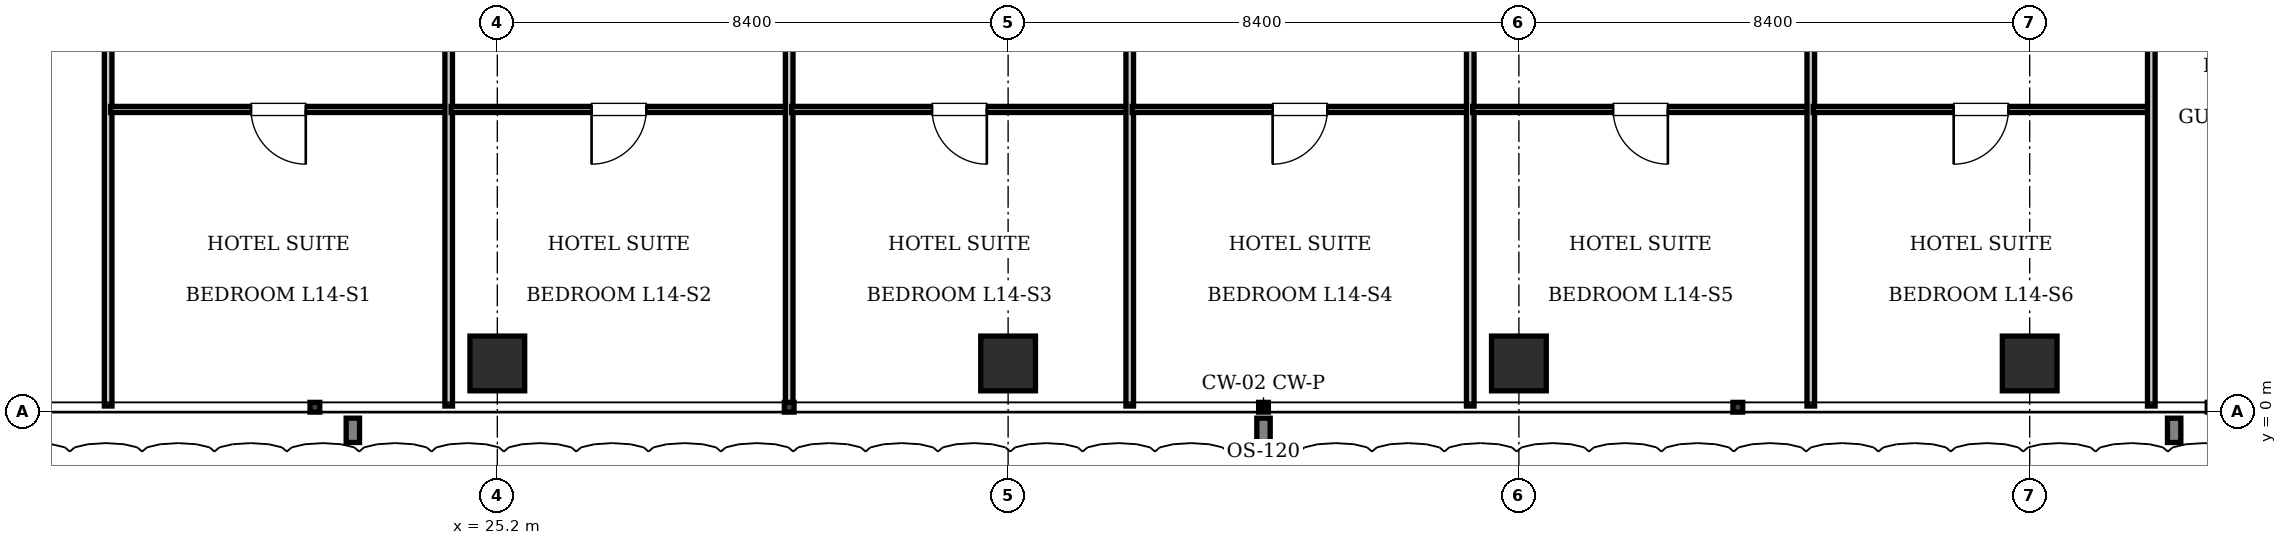
"""IFC4 building model, lengths in metres.
Left out: names, types, materials, properties, quantities, classifications, styles, units other than length and angle.
Written with IfcOpenShell. Run it as: python <this file> out.ifc"""

import sys

from ifc_helpers import new_model, si_unit, direction, frame, frame_2d, origin, origin_2d, place, context, subcontext, project, spatial, rectangle, extrude, element, fill, save


model = new_model("IFC4")
c1 = context("Model", 3, precision=1e-05, world=origin(), true_north=direction((0.0, 1.0)))
c2 = subcontext(c1, "Body", "Model", "MODEL_VIEW")
j1 = project(units=[si_unit("LENGTHUNIT", "METRE"), si_unit("PLANEANGLEUNIT", "RADIAN")], contexts=[c1])
p1 = place(None, origin())
s1 = spatial("IfcSite", under=j1, at=p1, CompositionType="ELEMENT")
p2 = place(p1, origin())
s2 = spatial("IfcBuilding", under=s1, at=p2, CompositionType="ELEMENT")
p3 = place(p2, frame((0.0, 0.0, 61.6)))
s3 = spatial("IfcBuildingStorey", under=s2, at=p3, CompositionType="ELEMENT", Elevation=61.6)
for number, where, z_axis, x_axis in (
    (1, (25.2, 0.8, 0.0), (0.0, 0.0, 1.0), (1.0, 0.0, 0.0)),
    (2, (33.6, 0.8, 0.0), (0.0, 0.0, 1.0), (1.0, 0.0, 0.0)),
    (3, (42.0, 0.8, 0.0), (0.0, 0.0, 1.0), (1.0, 0.0, 0.0)),
    (4, (50.4, 0.8, 0.0), (0.0, 0.0, 1.0), (1.0, 0.0, 0.0)),
):
    element("IfcColumn", number, at=place(p3, frame(where, z_axis=z_axis, x_axis=x_axis)), inside=s3, PredefinedType="COLUMN", context=c2, shape_type="SweptSolid", body=[
        extrude(rectangle(XDim=0.9, YDim=0.9, at=origin_2d()), origin(), (0.0, 0.0, 1.0), 3.85),
    ])
p4 = place(p3, frame((18.8, 0.1, 0.0), z_axis=(0.0, 0.0, 1.0), x_axis=(0.0, 1.0, 0.0)))
e5 = element("IfcWall", 5, at=p4, inside=s3, PredefinedType="PARTITIONING", context=c2, shape_type="SweptSolid", body=[
    extrude(rectangle(XDim=13.22, YDim=0.125, at=frame_2d((6.61, 0.0))), origin(), (0.0, 0.0, 1.0), 3.61),
])
p5 = place(p3, frame((18.84, 4.977, 0.0), z_axis=(0.0, 0.0, 1.0), x_axis=(1.0, 0.0, 0.0)))
e6 = element("IfcWall", 6, at=p5, inside=s3, PredefinedType="PARTITIONING", context=c2, shape_type="SweptSolid", body=[
    extrude(rectangle(XDim=5.52, YDim=0.1, at=frame_2d((2.76, 0.0))), origin(), (0.0, 0.0, 1.0), 3.61),
])
p6 = place(p5, frame((2.31, 0.0, 0.0)))
e7 = element("IfcOpeningElement", 7, at=p6, cuts=e6, PredefinedType="OPENING", context=c2, shape_type="SweptSolid", body=[
    extrude(rectangle(XDim=0.9, YDim=2.1, at=frame_2d((0.45, 1.05))), frame((0.0, 0.06, 0.0), z_axis=(0.0, -1.0, 0.0), x_axis=(1.0, 0.0, 0.0)), (0.0, 0.0, 1.0), 0.12),
])
p7 = place(p3, frame((24.4, 0.1, 0.0), z_axis=(0.0, 0.0, 1.0), x_axis=(0.0, 1.0, 0.0)))
e8 = element("IfcWall", 8, at=p7, inside=s3, PredefinedType="PARTITIONING", context=c2, shape_type="SweptSolid", body=[
    extrude(rectangle(XDim=13.22, YDim=0.125, at=frame_2d((6.61, 0.0))), origin(), (0.0, 0.0, 1.0), 3.61),
])
p8 = place(p3, frame((24.44, 4.977, 0.0), z_axis=(0.0, 0.0, 1.0), x_axis=(1.0, 0.0, 0.0)))
e9 = element("IfcWall", 9, at=p8, inside=s3, PredefinedType="PARTITIONING", context=c2, shape_type="SweptSolid", body=[
    extrude(rectangle(XDim=5.52, YDim=0.1, at=frame_2d((2.76, 0.0))), origin(), (0.0, 0.0, 1.0), 3.61),
])
p9 = place(p8, frame((2.31, 0.0, 0.0)))
e10 = element("IfcOpeningElement", 10, at=p9, cuts=e9, PredefinedType="OPENING", context=c2, shape_type="SweptSolid", body=[
    extrude(rectangle(XDim=0.9, YDim=2.1, at=frame_2d((0.45, 1.05))), frame((0.0, 0.06, 0.0), z_axis=(0.0, -1.0, 0.0), x_axis=(1.0, 0.0, 0.0)), (0.0, 0.0, 1.0), 0.12),
])
p10 = place(p3, frame((30.0, 0.1, 0.0), z_axis=(0.0, 0.0, 1.0), x_axis=(0.0, 1.0, 0.0)))
e11 = element("IfcWall", 11, at=p10, inside=s3, PredefinedType="PARTITIONING", context=c2, shape_type="SweptSolid", body=[
    extrude(rectangle(XDim=13.22, YDim=0.125, at=frame_2d((6.61, 0.0))), origin(), (0.0, 0.0, 1.0), 3.61),
])
p11 = place(p3, frame((30.04, 4.977, 0.0), z_axis=(0.0, 0.0, 1.0), x_axis=(1.0, 0.0, 0.0)))
e12 = element("IfcWall", 12, at=p11, inside=s3, PredefinedType="PARTITIONING", context=c2, shape_type="SweptSolid", body=[
    extrude(rectangle(XDim=5.52, YDim=0.1, at=frame_2d((2.76, 0.0))), origin(), (0.0, 0.0, 1.0), 3.61),
])
p12 = place(p11, frame((2.31, 0.0, 0.0)))
e13 = element("IfcOpeningElement", 13, at=p12, cuts=e12, PredefinedType="OPENING", context=c2, shape_type="SweptSolid", body=[
    extrude(rectangle(XDim=0.9, YDim=2.1, at=frame_2d((0.45, 1.05))), frame((0.0, 0.06, 0.0), z_axis=(0.0, -1.0, 0.0), x_axis=(1.0, 0.0, 0.0)), (0.0, 0.0, 1.0), 0.12),
])
p13 = place(p3, frame((35.6, 0.1, 0.0), z_axis=(0.0, 0.0, 1.0), x_axis=(0.0, 1.0, 0.0)))
e14 = element("IfcWall", 14, at=p13, inside=s3, PredefinedType="PARTITIONING", context=c2, shape_type="SweptSolid", body=[
    extrude(rectangle(XDim=13.22, YDim=0.125, at=frame_2d((6.61, 0.0))), origin(), (0.0, 0.0, 1.0), 3.61),
])
p14 = place(p3, frame((35.64, 4.977, 0.0), z_axis=(0.0, 0.0, 1.0), x_axis=(1.0, 0.0, 0.0)))
e15 = element("IfcWall", 15, at=p14, inside=s3, PredefinedType="PARTITIONING", context=c2, shape_type="SweptSolid", body=[
    extrude(rectangle(XDim=5.52, YDim=0.1, at=frame_2d((2.76, 0.0))), origin(), (0.0, 0.0, 1.0), 3.61),
])
p15 = place(p14, frame((2.31, 0.0, 0.0)))
e16 = element("IfcOpeningElement", 16, at=p15, cuts=e15, PredefinedType="OPENING", context=c2, shape_type="SweptSolid", body=[
    extrude(rectangle(XDim=0.9, YDim=2.1, at=frame_2d((0.45, 1.05))), frame((0.0, 0.06, 0.0), z_axis=(0.0, -1.0, 0.0), x_axis=(1.0, 0.0, 0.0)), (0.0, 0.0, 1.0), 0.12),
])
p16 = place(p3, frame((41.2, 0.1, 0.0), z_axis=(0.0, 0.0, 1.0), x_axis=(0.0, 1.0, 0.0)))
e17 = element("IfcWall", 17, at=p16, inside=s3, PredefinedType="PARTITIONING", context=c2, shape_type="SweptSolid", body=[
    extrude(rectangle(XDim=13.22, YDim=0.125, at=frame_2d((6.61, 0.0))), origin(), (0.0, 0.0, 1.0), 3.61),
])
p17 = place(p3, frame((41.24, 4.977, 0.0), z_axis=(0.0, 0.0, 1.0), x_axis=(1.0, 0.0, 0.0)))
e18 = element("IfcWall", 18, at=p17, inside=s3, PredefinedType="PARTITIONING", context=c2, shape_type="SweptSolid", body=[
    extrude(rectangle(XDim=5.52, YDim=0.1, at=frame_2d((2.76, 0.0))), origin(), (0.0, 0.0, 1.0), 3.61),
])
p18 = place(p17, frame((2.31, 0.0, 0.0)))
e19 = element("IfcOpeningElement", 19, at=p18, cuts=e18, PredefinedType="OPENING", context=c2, shape_type="SweptSolid", body=[
    extrude(rectangle(XDim=0.9, YDim=2.1, at=frame_2d((0.45, 1.05))), frame((0.0, 0.06, 0.0), z_axis=(0.0, -1.0, 0.0), x_axis=(1.0, 0.0, 0.0)), (0.0, 0.0, 1.0), 0.12),
])
p19 = place(p3, frame((46.8, 0.1, 0.0), z_axis=(0.0, 0.0, 1.0), x_axis=(0.0, 1.0, 0.0)))
e20 = element("IfcWall", 20, at=p19, inside=s3, PredefinedType="PARTITIONING", context=c2, shape_type="SweptSolid", body=[
    extrude(rectangle(XDim=13.22, YDim=0.125, at=frame_2d((6.61, 0.0))), origin(), (0.0, 0.0, 1.0), 3.61),
])
p20 = place(p3, frame((46.84, 4.977, 0.0), z_axis=(0.0, 0.0, 1.0), x_axis=(1.0, 0.0, 0.0)))
e21 = element("IfcWall", 21, at=p20, inside=s3, PredefinedType="PARTITIONING", context=c2, shape_type="SweptSolid", body=[
    extrude(rectangle(XDim=5.52, YDim=0.1, at=frame_2d((2.76, 0.0))), origin(), (0.0, 0.0, 1.0), 3.61),
])
p21 = place(p20, frame((2.31, 0.0, 0.0)))
e22 = element("IfcOpeningElement", 22, at=p21, cuts=e21, PredefinedType="OPENING", context=c2, shape_type="SweptSolid", body=[
    extrude(rectangle(XDim=0.9, YDim=2.1, at=frame_2d((0.45, 1.05))), frame((0.0, 0.06, 0.0), z_axis=(0.0, -1.0, 0.0), x_axis=(1.0, 0.0, 0.0)), (0.0, 0.0, 1.0), 0.12),
])
p22 = place(p3, frame((52.4, 0.1, 0.0), z_axis=(0.0, 0.0, 1.0), x_axis=(0.0, 1.0, 0.0)))
e23 = element("IfcWall", 23, at=p22, inside=s3, PredefinedType="PARTITIONING", context=c2, shape_type="SweptSolid", body=[
    extrude(rectangle(XDim=13.22, YDim=0.125, at=frame_2d((6.61, 0.0))), origin(), (0.0, 0.0, 1.0), 3.61),
])
p23 = place(p6, frame((0.9, 0.0, 0.0), z_axis=(0.0, 0.0, 1.0), x_axis=(-1.0, 0.0, 0.0)))
e24 = element("IfcDoor", 24, at=p23, inside=s3, OperationType="SINGLE_SWING_LEFT", PredefinedType="DOOR", context=c2, shape_type="SweptSolid", body=[
    extrude(rectangle(XDim=0.9, YDim=2.1, at=frame_2d((0.45, 1.05))), frame((0.0, 0.025, 0.0), z_axis=(0.0, -1.0, 0.0), x_axis=(1.0, 0.0, 0.0)), (0.0, 0.0, 1.0), 0.05),
])
fill(e7, e24)
p24 = place(p9, frame((0.9, 0.0, 0.0), z_axis=(0.0, 0.0, 1.0), x_axis=(-1.0, 0.0, 0.0)))
e25 = element("IfcDoor", 25, at=p24, inside=s3, OperationType="SINGLE_SWING_RIGHT", PredefinedType="DOOR", context=c2, shape_type="SweptSolid", body=[
    extrude(rectangle(XDim=0.9, YDim=2.1, at=frame_2d((0.45, 1.05))), frame((0.0, 0.025, 0.0), z_axis=(0.0, -1.0, 0.0), x_axis=(1.0, 0.0, 0.0)), (0.0, 0.0, 1.0), 0.05),
])
fill(e10, e25)
p25 = place(p12, frame((0.9, 0.0, 0.0), z_axis=(0.0, 0.0, 1.0), x_axis=(-1.0, 0.0, 0.0)))
e26 = element("IfcDoor", 26, at=p25, inside=s3, OperationType="SINGLE_SWING_LEFT", PredefinedType="DOOR", context=c2, shape_type="SweptSolid", body=[
    extrude(rectangle(XDim=0.9, YDim=2.1, at=frame_2d((0.45, 1.05))), frame((0.0, 0.025, 0.0), z_axis=(0.0, -1.0, 0.0), x_axis=(1.0, 0.0, 0.0)), (0.0, 0.0, 1.0), 0.05),
])
fill(e13, e26)
p26 = place(p15, frame((0.9, 0.0, 0.0), z_axis=(0.0, 0.0, 1.0), x_axis=(-1.0, 0.0, 0.0)))
e27 = element("IfcDoor", 27, at=p26, inside=s3, OperationType="SINGLE_SWING_RIGHT", PredefinedType="DOOR", context=c2, shape_type="SweptSolid", body=[
    extrude(rectangle(XDim=0.9, YDim=2.1, at=frame_2d((0.45, 1.05))), frame((0.0, 0.025, 0.0), z_axis=(0.0, -1.0, 0.0), x_axis=(1.0, 0.0, 0.0)), (0.0, 0.0, 1.0), 0.05),
])
fill(e16, e27)
p27 = place(p18, frame((0.9, 0.0, 0.0), z_axis=(0.0, 0.0, 1.0), x_axis=(-1.0, 0.0, 0.0)))
e28 = element("IfcDoor", 28, at=p27, inside=s3, OperationType="SINGLE_SWING_LEFT", PredefinedType="DOOR", context=c2, shape_type="SweptSolid", body=[
    extrude(rectangle(XDim=0.9, YDim=2.1, at=frame_2d((0.45, 1.05))), frame((0.0, 0.025, 0.0), z_axis=(0.0, -1.0, 0.0), x_axis=(1.0, 0.0, 0.0)), (0.0, 0.0, 1.0), 0.05),
])
fill(e19, e28)
p28 = place(p21, frame((0.9, 0.0, 0.0), z_axis=(0.0, 0.0, 1.0), x_axis=(-1.0, 0.0, 0.0)))
e29 = element("IfcDoor", 29, at=p28, inside=s3, OperationType="SINGLE_SWING_RIGHT", PredefinedType="DOOR", context=c2, shape_type="SweptSolid", body=[
    extrude(rectangle(XDim=0.9, YDim=2.1, at=frame_2d((0.45, 1.05))), frame((0.0, 0.025, 0.0), z_axis=(0.0, -1.0, 0.0), x_axis=(1.0, 0.0, 0.0)), (0.0, 0.0, 1.0), 0.05),
])
fill(e22, e29)
save(model, sys.argv[1])
